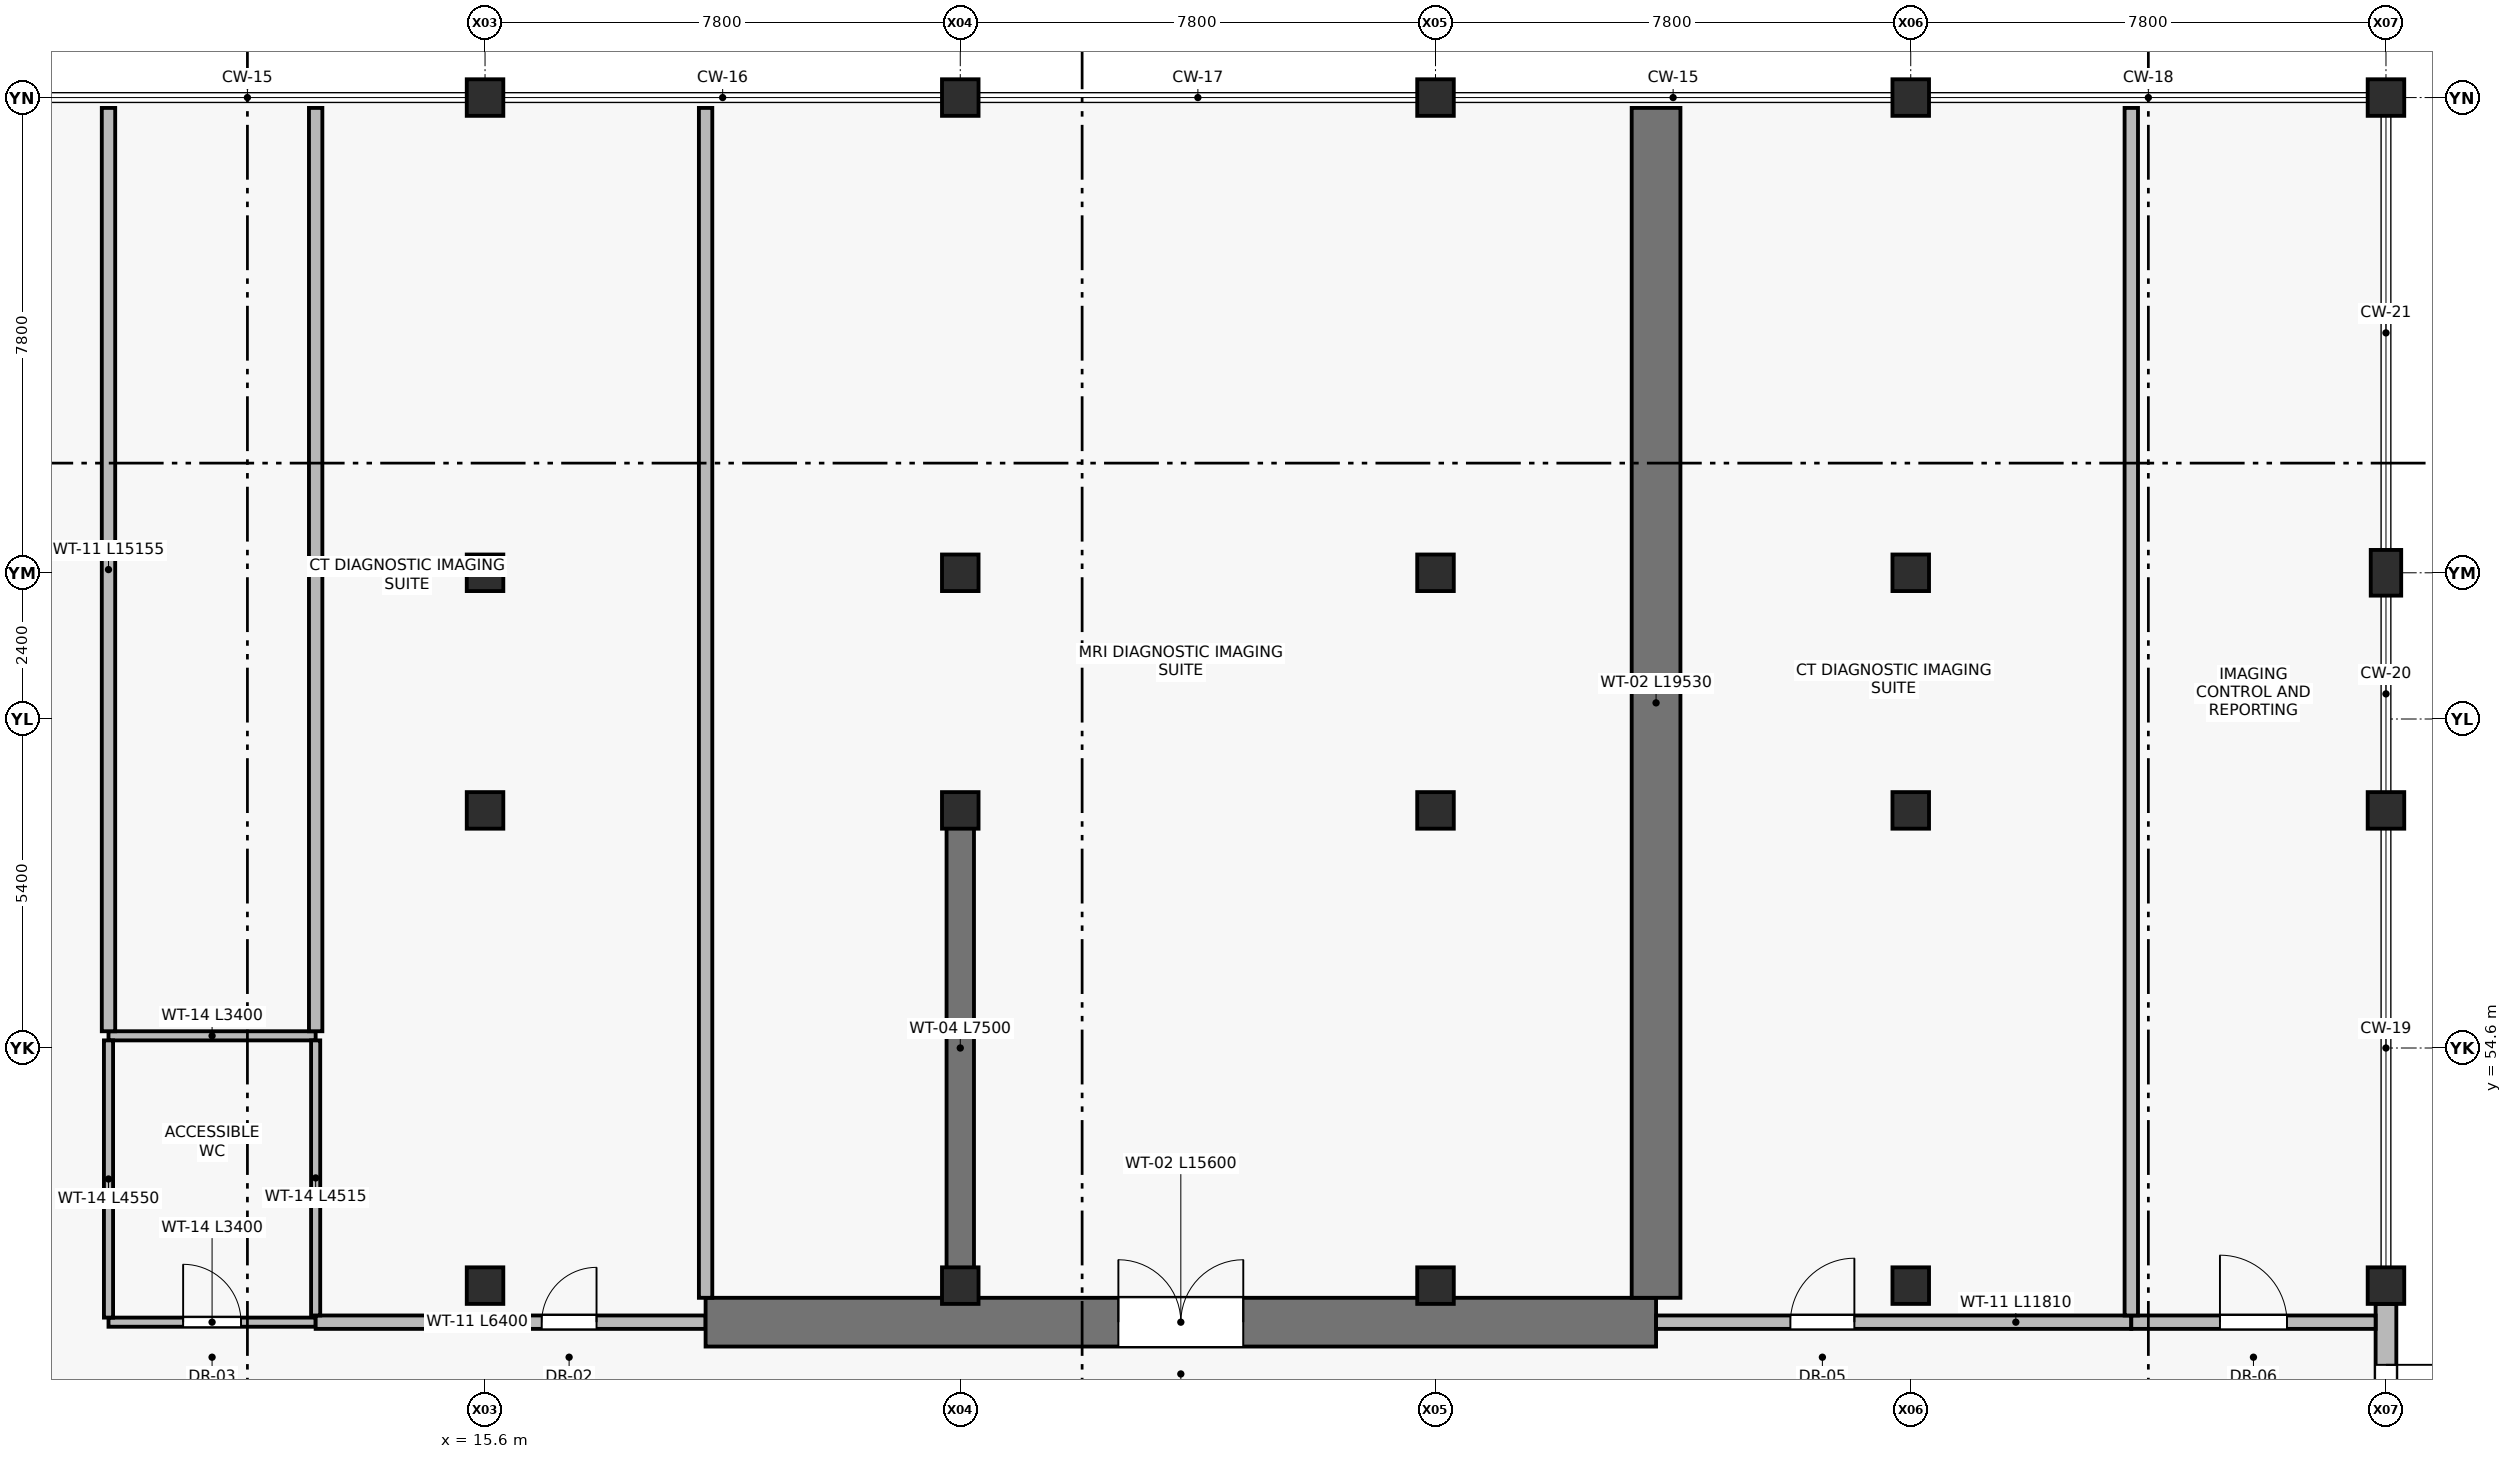
"""IFC4 building model, lengths in metres.
Left out: names, types, materials, properties, quantities, classifications, styles, units other than length and angle.
Written with IfcOpenShell. Run it as: python <this file> out.ifc"""

import sys

from ifc_helpers import new_model, si_unit, direction, frame, frame_2d, origin, origin_2d, place, context, subcontext, project, spatial, rectangle, extrude, element, fill, save


model = new_model("IFC4")
c1 = context("Model", 3, precision=1e-05, world=origin(), true_north=direction((0.0, 1.0)))
c2 = subcontext(c1, "Body", "Model", "MODEL_VIEW")
j1 = project(units=[si_unit("LENGTHUNIT", "METRE"), si_unit("PLANEANGLEUNIT", "RADIAN")], contexts=[c1])
p1 = place(None, origin())
s1 = spatial("IfcSite", under=j1, at=p1, CompositionType="ELEMENT")
p2 = place(p1, origin())
s2 = spatial("IfcBuilding", under=s1, at=p2, CompositionType="ELEMENT")
p3 = place(p2, origin())
s3 = spatial("IfcBuildingStorey", under=s2, at=p3, CompositionType="ELEMENT", Elevation=0.0)
for number, where, z_axis, x_axis in (
    (1, (15.6, 50.7, 0.0), (0.0, 0.0, 1.0), (1.0, 0.0, 0.0)),
    (2, (15.6, 58.5, 0.0), (0.0, 0.0, 1.0), (1.0, 0.0, 0.0)),
    (3, (15.6, 62.4, 0.0), (0.0, 0.0, 1.0), (1.0, 0.0, 0.0)),
    (4, (15.6, 70.2, 0.0), (0.0, 0.0, 1.0), (1.0, 0.0, 0.0)),
    (5, (23.4, 50.7, 0.0), (0.0, 0.0, 1.0), (1.0, 0.0, 0.0)),
    (6, (23.4, 58.5, 0.0), (0.0, 0.0, 1.0), (1.0, 0.0, 0.0)),
    (7, (23.4, 62.4, 0.0), (0.0, 0.0, 1.0), (1.0, 0.0, 0.0)),
    (8, (23.4, 70.2, 0.0), (0.0, 0.0, 1.0), (1.0, 0.0, 0.0)),
    (9, (31.2, 50.7, 0.0), (0.0, 0.0, 1.0), (1.0, 0.0, 0.0)),
    (10, (31.2, 58.5, 0.0), (0.0, 0.0, 1.0), (1.0, 0.0, 0.0)),
    (11, (31.2, 62.4, 0.0), (0.0, 0.0, 1.0), (1.0, 0.0, 0.0)),
    (12, (31.2, 70.2, 0.0), (0.0, 0.0, 1.0), (1.0, 0.0, 0.0)),
    (13, (39.0, 50.7, 0.0), (0.0, 0.0, 1.0), (1.0, 0.0, 0.0)),
    (14, (39.0, 58.5, 0.0), (0.0, 0.0, 1.0), (1.0, 0.0, 0.0)),
    (15, (39.0, 62.4, 0.0), (0.0, 0.0, 1.0), (1.0, 0.0, 0.0)),
    (16, (39.0, 70.2, 0.0), (0.0, 0.0, 1.0), (1.0, 0.0, 0.0)),
    (17, (46.8, 50.7, 0.0), (0.0, 0.0, 1.0), (1.0, 0.0, 0.0)),
    (18, (46.8, 58.5, 0.0), (0.0, 0.0, 1.0), (1.0, 0.0, 0.0)),
):
    element("IfcColumn", number, at=place(p3, frame(where, z_axis=z_axis, x_axis=x_axis)), inside=s3, PredefinedType="COLUMN", context=c2, shape_type="SweptSolid", body=[
        extrude(rectangle(XDim=0.6, YDim=0.6, at=origin_2d()), origin(), (0.0, 0.0, 1.0), 4.8),
    ])
p4 = place(p3, frame((46.8, 62.4, 0.0), z_axis=(0.0, 0.0, 1.0), x_axis=(1.0, 0.0, 0.0)))
e19 = element("IfcColumn", 19, at=p4, inside=s3, PredefinedType="COLUMN", context=c2, shape_type="SweptSolid", body=[
    extrude(rectangle(XDim=0.5, YDim=0.75, at=origin_2d()), origin(), (0.0, 0.0, 1.0), 4.8),
])
p5 = place(p3, frame((46.8, 70.2, 0.0), z_axis=(0.0, 0.0, 1.0), x_axis=(1.0, 0.0, 0.0)))
e20 = element("IfcColumn", 20, at=p5, inside=s3, PredefinedType="COLUMN", context=c2, shape_type="SweptSolid", body=[
    extrude(rectangle(XDim=0.6, YDim=0.6, at=origin_2d()), origin(), (0.0, 0.0, 1.0), 4.8),
])
p6 = place(p3, frame((46.8, 50.4, 0.0), z_axis=(0.0, 0.0, 1.0), x_axis=(0.0, -1.0, 0.0)))
e21 = element("IfcWall", 21, at=p6, inside=s3, PredefinedType="STANDARD", context=c2, shape_type="SweptSolid", body=[
    extrude(rectangle(XDim=7.2, YDim=0.34, at=frame_2d((3.6, 0.0))), origin(), (0.0, 0.0, 1.0), 4.06),
])
p7 = place(p6, frame((1.0, 0.0, 0.0)))
e22 = element("IfcOpeningElement", 22, at=p7, cuts=e21, PredefinedType="OPENING", context=c2, shape_type="SweptSolid", body=[
    extrude(rectangle(XDim=1.8, YDim=2.25, at=frame_2d((0.9, 1.125))), frame((0.0, 0.18, 0.0), z_axis=(0.0, -1.0, 0.0), x_axis=(1.0, 0.0, 0.0)), (0.0, 0.0, 1.0), 0.36),
])
p8 = place(p3, frame((23.4, 50.85, 0.0), z_axis=(0.0, 0.0, 1.0), x_axis=(0.0, 1.0, 0.0)))
e23 = element("IfcWall", 23, at=p8, inside=s3, PredefinedType="SHEAR", context=c2, shape_type="SweptSolid", body=[
    extrude(rectangle(XDim=7.5, YDim=0.45, at=frame_2d((3.75, 0.0))), origin(), (0.0, 0.0, 1.0), 4.46),
])
p9 = place(p3, frame((9.42, 50.1, 0.0), z_axis=(0.0, 0.0, 1.0), x_axis=(1.0, 0.0, 0.0)))
e24 = element("IfcWall", 24, at=p9, inside=s3, PredefinedType="PARTITIONING", context=c2, shape_type="SweptSolid", body=[
    extrude(rectangle(XDim=3.4, YDim=0.15, at=frame_2d((1.7, 0.0))), origin(), (0.0, 0.0, 1.0), 4.46),
])
p10 = place(p9, frame((1.225, 0.0, 0.0)))
e25 = element("IfcOpeningElement", 25, at=p10, cuts=e24, PredefinedType="OPENING", context=c2, shape_type="SweptSolid", body=[
    extrude(rectangle(XDim=0.95, YDim=2.1, at=frame_2d((0.475, 1.05))), frame((0.0, 0.085, 0.0), z_axis=(0.0, -1.0, 0.0), x_axis=(1.0, 0.0, 0.0)), (0.0, 0.0, 1.0), 0.17),
])
p11 = place(p3, frame((9.42, 54.8, 0.0), z_axis=(0.0, 0.0, 1.0), x_axis=(1.0, 0.0, 0.0)))
e26 = element("IfcWall", 26, at=p11, inside=s3, PredefinedType="PARTITIONING", context=c2, shape_type="SweptSolid", body=[
    extrude(rectangle(XDim=3.4, YDim=0.15, at=frame_2d((1.7, 0.0))), origin(), (0.0, 0.0, 1.0), 4.46),
])
p12 = place(p3, frame((12.82, 50.1, 0.0), z_axis=(0.0, 0.0, 1.0), x_axis=(1.0, 0.0, 0.0)))
e27 = element("IfcWall", 27, at=p12, inside=s3, PredefinedType="PARTITIONING", context=c2, shape_type="SweptSolid", body=[
    extrude(rectangle(XDim=6.4, YDim=0.22, at=frame_2d((3.2, 0.0))), origin(), (0.0, 0.0, 1.0), 4.46),
])
p13 = place(p12, frame((3.71, 0.0, 0.0)))
e28 = element("IfcOpeningElement", 28, at=p13, cuts=e27, PredefinedType="OPENING", context=c2, shape_type="SweptSolid", body=[
    extrude(rectangle(XDim=0.9, YDim=2.1, at=frame_2d((0.45, 1.05))), frame((0.0, 0.12, 0.0), z_axis=(0.0, -1.0, 0.0), x_axis=(1.0, 0.0, 0.0)), (0.0, 0.0, 1.0), 0.24),
])
p14 = place(p3, frame((19.22, 50.1, 0.0), z_axis=(0.0, 0.0, 1.0), x_axis=(1.0, 0.0, 0.0)))
e29 = element("IfcWall", 29, at=p14, inside=s3, PredefinedType="SOLIDWALL", context=c2, shape_type="SweptSolid", body=[
    extrude(rectangle(XDim=15.6, YDim=0.8, at=frame_2d((7.8, 0.0))), origin(), (0.0, 0.0, 1.0), 4.46),
])
p15 = place(p14, frame((6.775, 0.0, 0.0)))
e30 = element("IfcOpeningElement", 30, at=p15, cuts=e29, PredefinedType="OPENING", context=c2, shape_type="SweptSolid", body=[
    extrude(rectangle(XDim=2.05, YDim=2.3, at=frame_2d((1.025, 1.15))), frame((0.0, 0.41, 0.0), z_axis=(0.0, -1.0, 0.0), x_axis=(1.0, 0.0, 0.0)), (0.0, 0.0, 1.0), 0.82),
])
p16 = place(p3, frame((34.82, 50.1, 0.0), z_axis=(0.0, 0.0, 1.0), x_axis=(1.0, 0.0, 0.0)))
e31 = element("IfcWall", 31, at=p16, inside=s3, PredefinedType="PARTITIONING", context=c2, shape_type="SweptSolid", body=[
    extrude(rectangle(XDim=7.8, YDim=0.22, at=frame_2d((3.9, 0.0))), origin(), (0.0, 0.0, 1.0), 4.46),
])
p17 = place(p16, frame((2.205, 0.0, 0.0)))
e32 = element("IfcOpeningElement", 32, at=p17, cuts=e31, PredefinedType="OPENING", context=c2, shape_type="SweptSolid", body=[
    extrude(rectangle(XDim=1.05, YDim=2.15, at=frame_2d((0.525, 1.075))), frame((0.0, 0.12, 0.0), z_axis=(0.0, -1.0, 0.0), x_axis=(1.0, 0.0, 0.0)), (0.0, 0.0, 1.0), 0.24),
])
p18 = place(p3, frame((42.62, 50.1, 0.0), z_axis=(0.0, 0.0, 1.0), x_axis=(1.0, 0.0, 0.0)))
e33 = element("IfcWall", 33, at=p18, inside=s3, PredefinedType="PARTITIONING", context=c2, shape_type="SweptSolid", body=[
    extrude(rectangle(XDim=4.01, YDim=0.22, at=frame_2d((2.005, 0.0))), origin(), (0.0, 0.0, 1.0), 4.46),
])
p19 = place(p18, frame((1.455, 0.0, 0.0)))
e34 = element("IfcOpeningElement", 34, at=p19, cuts=e33, PredefinedType="OPENING", context=c2, shape_type="SweptSolid", body=[
    extrude(rectangle(XDim=1.1, YDim=2.15, at=frame_2d((0.55, 1.075))), frame((0.0, 0.12, 0.0), z_axis=(0.0, -1.0, 0.0), x_axis=(1.0, 0.0, 0.0)), (0.0, 0.0, 1.0), 0.24),
])
p20 = place(p3, frame((9.42, 50.175, 0.0), z_axis=(0.0, 0.0, 1.0), x_axis=(0.0, 1.0, 0.0)))
e35 = element("IfcWall", 35, at=p20, inside=s3, PredefinedType="PARTITIONING", context=c2, shape_type="SweptSolid", body=[
    extrude(rectangle(XDim=4.55, YDim=0.15, at=frame_2d((2.275, 0.0))), origin(), (0.0, 0.0, 1.0), 4.46),
])
p21 = place(p3, frame((12.82, 50.21, 0.0), z_axis=(0.0, 0.0, 1.0), x_axis=(0.0, 1.0, 0.0)))
e36 = element("IfcWall", 36, at=p21, inside=s3, PredefinedType="PARTITIONING", context=c2, shape_type="SweptSolid", body=[
    extrude(rectangle(XDim=4.515, YDim=0.15, at=frame_2d((2.258, 0.0))), origin(), (0.0, 0.0, 1.0), 4.13),
])
p22 = place(p3, frame((12.82, 54.875, 0.0), z_axis=(0.0, 0.0, 1.0), x_axis=(0.0, 1.0, 0.0)))
e37 = element("IfcWall", 37, at=p22, inside=s3, PredefinedType="PARTITIONING", context=c2, shape_type="SweptSolid", body=[
    extrude(rectangle(XDim=15.155, YDim=0.22, at=frame_2d((7.578, 0.0))), origin(), (0.0, 0.0, 1.0), 4.13),
])
p23 = place(p3, frame((19.22, 50.5, 0.0), z_axis=(0.0, 0.0, 1.0), x_axis=(0.0, 1.0, 0.0)))
e38 = element("IfcWall", 38, at=p23, inside=s3, PredefinedType="PARTITIONING", context=c2, shape_type="SweptSolid", body=[
    extrude(rectangle(XDim=19.53, YDim=0.22, at=frame_2d((9.765, 0.0))), origin(), (0.0, 0.0, 1.0), 4.46),
])
p24 = place(p3, frame((9.42, 54.875, 0.0), z_axis=(0.0, 0.0, 1.0), x_axis=(0.0, 1.0, 0.0)))
e39 = element("IfcWall", 39, at=p24, inside=s3, PredefinedType="PARTITIONING", context=c2, shape_type="SweptSolid", body=[
    extrude(rectangle(XDim=15.155, YDim=0.22, at=frame_2d((7.578, 0.0))), origin(), (0.0, 0.0, 1.0), 4.46),
])
p25 = place(p3, frame((34.82, 50.5, 0.0), z_axis=(0.0, 0.0, 1.0), x_axis=(0.0, 1.0, 0.0)))
e40 = element("IfcWall", 40, at=p25, inside=s3, PredefinedType="SOLIDWALL", context=c2, shape_type="SweptSolid", body=[
    extrude(rectangle(XDim=19.53, YDim=0.8, at=frame_2d((9.765, 0.0))), origin(), (0.0, 0.0, 1.0), 4.46),
])
p26 = place(p3, frame((42.62, 50.21, 0.0), z_axis=(0.0, 0.0, 1.0), x_axis=(0.0, 1.0, 0.0)))
e41 = element("IfcWall", 41, at=p26, inside=s3, PredefinedType="PARTITIONING", context=c2, shape_type="SweptSolid", body=[
    extrude(rectangle(XDim=19.82, YDim=0.22, at=frame_2d((9.91, 0.0))), origin(), (0.0, 0.0, 1.0), 4.46),
])
p27 = place(p7, origin())
e42 = element("IfcDoor", 42, at=p27, inside=s3, OperationType="DOUBLE_DOOR_SINGLE_SWING", PredefinedType="DOOR", context=c2, shape_type="SweptSolid", body=[
    extrude(rectangle(XDim=1.8, YDim=2.25, at=frame_2d((0.9, 1.125))), frame((0.0, 0.025, 0.0), z_axis=(0.0, -1.0, 0.0), x_axis=(1.0, 0.0, 0.0)), (0.0, 0.0, 1.0), 0.05),
])
fill(e22, e42)
p28 = place(p10, origin())
e43 = element("IfcDoor", 43, at=p28, inside=s3, OperationType="SINGLE_SWING_LEFT", PredefinedType="DOOR", context=c2, shape_type="SweptSolid", body=[
    extrude(rectangle(XDim=0.95, YDim=2.1, at=frame_2d((0.475, 1.05))), frame((0.0, 0.025, 0.0), z_axis=(0.0, -1.0, 0.0), x_axis=(1.0, 0.0, 0.0)), (0.0, 0.0, 1.0), 0.05),
])
fill(e25, e43)
p29 = place(p13, origin())
e44 = element("IfcDoor", 44, at=p29, inside=s3, OperationType="SINGLE_SWING_RIGHT", PredefinedType="DOOR", context=c2, shape_type="SweptSolid", body=[
    extrude(rectangle(XDim=0.9, YDim=2.1, at=frame_2d((0.45, 1.05))), frame((0.0, 0.025, 0.0), z_axis=(0.0, -1.0, 0.0), x_axis=(1.0, 0.0, 0.0)), (0.0, 0.0, 1.0), 0.05),
])
fill(e28, e44)
p30 = place(p15, origin())
e45 = element("IfcDoor", 45, at=p30, inside=s3, OperationType="DOUBLE_DOOR_SINGLE_SWING", PredefinedType="DOOR", context=c2, shape_type="SweptSolid", body=[
    extrude(rectangle(XDim=2.05, YDim=2.3, at=frame_2d((1.025, 1.15))), frame((0.0, 0.025, 0.0), z_axis=(0.0, -1.0, 0.0), x_axis=(1.0, 0.0, 0.0)), (0.0, 0.0, 1.0), 0.05),
])
fill(e30, e45)
p31 = place(p17, origin())
e46 = element("IfcDoor", 46, at=p31, inside=s3, OperationType="SINGLE_SWING_RIGHT", PredefinedType="DOOR", context=c2, shape_type="SweptSolid", body=[
    extrude(rectangle(XDim=1.05, YDim=2.15, at=frame_2d((0.525, 1.075))), frame((0.0, 0.025, 0.0), z_axis=(0.0, -1.0, 0.0), x_axis=(1.0, 0.0, 0.0)), (0.0, 0.0, 1.0), 0.05),
])
fill(e32, e46)
p32 = place(p19, origin())
e47 = element("IfcDoor", 47, at=p32, inside=s3, OperationType="SINGLE_SWING_LEFT", PredefinedType="DOOR", context=c2, shape_type="SweptSolid", body=[
    extrude(rectangle(XDim=1.1, YDim=2.15, at=frame_2d((0.55, 1.075))), frame((0.0, 0.025, 0.0), z_axis=(0.0, -1.0, 0.0), x_axis=(1.0, 0.0, 0.0)), (0.0, 0.0, 1.0), 0.05),
])
fill(e34, e47)
save(model, sys.argv[1])
